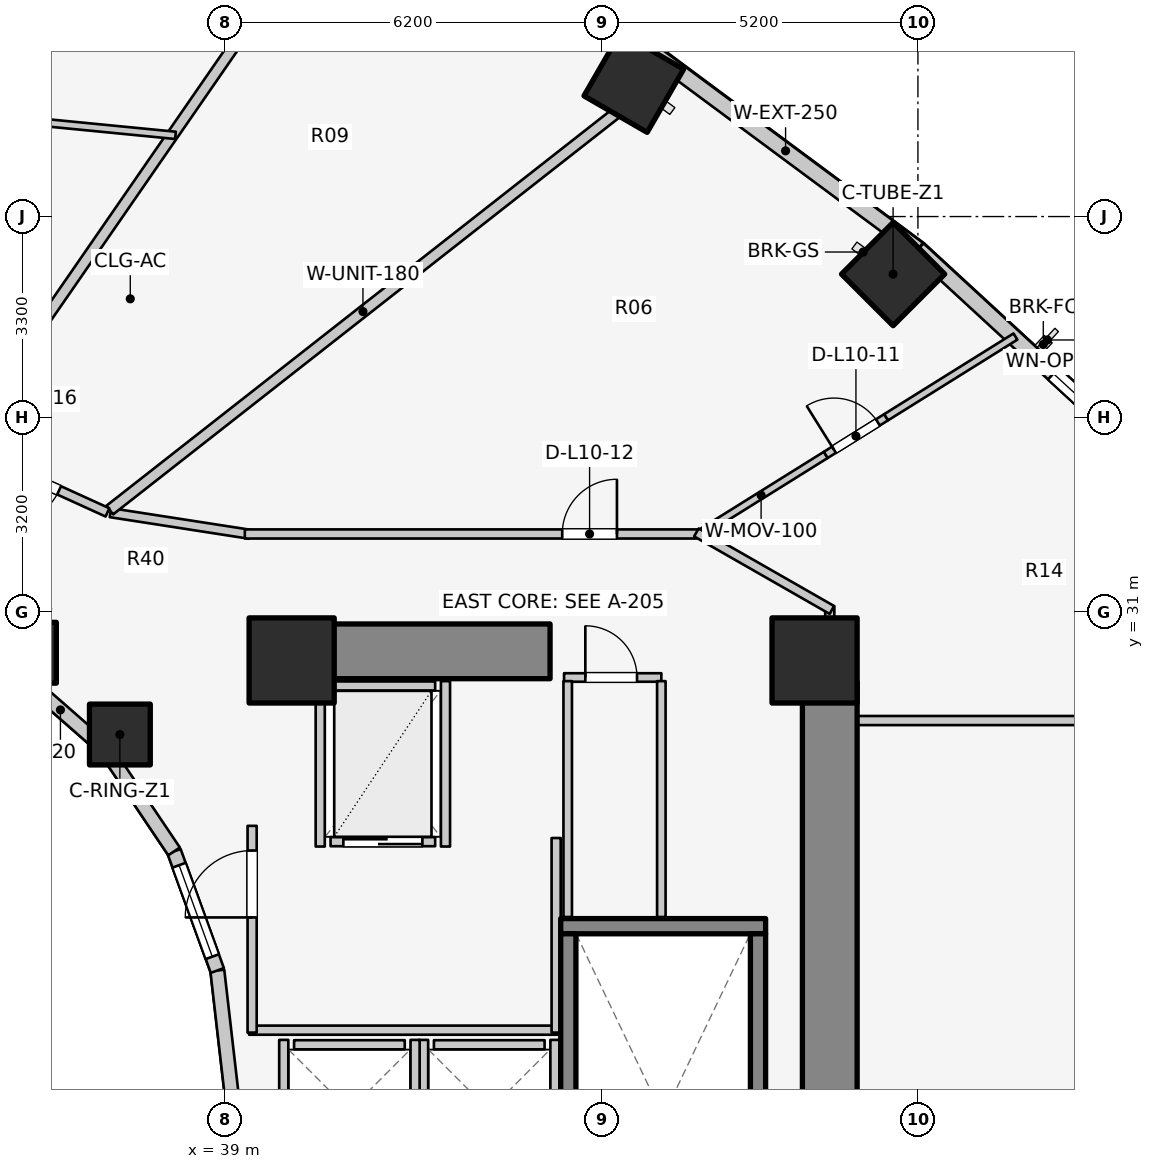
"""IFC4 building model, lengths in metres.
Left out: names, types, materials, properties, quantities, classifications, styles, units other than length and angle.
Written with IfcOpenShell. Run it as: python <this file> out.ifc"""

import sys

from ifc_helpers import new_model, si_unit, direction, frame, frame_2d, origin, origin_2d, place, context, subcontext, project, spatial, rectangle, extrude, element, fill, save


model = new_model("IFC4")
c1 = context("Model", 3, precision=1e-05, world=origin(), true_north=direction((0.0, 1.0)))
c2 = subcontext(c1, "Body", "Model", "MODEL_VIEW")
j1 = project(units=[si_unit("LENGTHUNIT", "METRE"), si_unit("PLANEANGLEUNIT", "RADIAN")], contexts=[c1])
p1 = place(None, origin())
s1 = spatial("IfcSite", under=j1, at=p1, CompositionType="ELEMENT")
p2 = place(p1, origin())
s2 = spatial("IfcBuilding", under=s1, at=p2, CompositionType="ELEMENT")
p3 = place(p2, frame((0.0, 0.0, 36.9)))
s3 = spatial("IfcBuildingStorey", under=s2, at=p3, CompositionType="ELEMENT", Elevation=36.9)
p4 = place(p3, frame((48.95, 17.05, 0.0), z_axis=(0.0, 0.0, 1.0), x_axis=(0.0, 1.0, 0.0)))
e1 = element("IfcWall", 1, at=p4, inside=s3, PredefinedType="SHEAR", context=c2, shape_type="SweptSolid", body=[
    extrude(rectangle(XDim=12.8, YDim=0.9, at=frame_2d((6.4, 0.0))), origin(), (0.0, 0.0, 1.0), 3.1),
])
p5 = place(p3, frame((39.85, 30.35, 0.0), z_axis=(0.0, 0.0, 1.0), x_axis=(1.0, 0.0, 0.0)))
e2 = element("IfcWall", 2, at=p5, inside=s3, PredefinedType="SHEAR", context=c2, shape_type="SweptSolid", body=[
    extrude(rectangle(XDim=4.5, YDim=0.9, at=frame_2d((2.25, 0.0))), origin(), (0.0, 0.0, 1.0), 3.1),
])
p6 = place(p3, frame((44.525, 25.83, 0.0), z_axis=(0.0, 0.0, 1.0), x_axis=(1.0, 0.0, 0.0)))
e3 = element("IfcWall", 3, at=p6, inside=s3, PredefinedType="SOLIDWALL", context=c2, shape_type="SweptSolid", body=[
    extrude(rectangle(XDim=3.37, YDim=0.25, at=frame_2d((1.685, 0.0))), origin(), (0.0, 0.0, 1.0), 3.1),
])
for number, where, z_axis, x_axis in (
    (4, (44.65, 17.895, 0.0), (0.0, 0.0, 1.0), (0.0, 1.0, 0.0)),
    (5, (47.77, 17.895, 0.0), (0.0, 0.0, 1.0), (0.0, 1.0, 0.0)),
):
    element("IfcWall", number, at=place(p3, frame(where, z_axis=z_axis, x_axis=x_axis)), inside=s3, PredefinedType="SOLIDWALL", context=c2, shape_type="SweptSolid", body=[
        extrude(rectangle(XDim=7.81, YDim=0.25, at=frame_2d((3.905, 0.0))), origin(), (0.0, 0.0, 1.0), 3.1),
    ])
for number, where, z_axis, x_axis in (
    (6, (48.7, 30.2, 0.0), (0.0, 0.0, 1.0), (1.0, 0.0, 0.0)),
    (7, (40.1, 30.2, 0.0), (0.0, 0.0, 1.0), (1.0, 0.0, 0.0)),
):
    element("IfcColumn", number, at=place(p3, frame(where, z_axis=z_axis, x_axis=x_axis)), inside=s3, PredefinedType="COLUMN", context=c2, shape_type="SweptSolid", body=[
        extrude(rectangle(XDim=1.4, YDim=1.4, at=origin_2d()), origin(), (0.0, 0.0, 1.0), 3.1),
    ])
p7 = place(p3, frame((37.275, 28.982, 0.0), z_axis=(0.0, 0.0, 1.0), x_axis=(1.0, 0.0, 0.0)))
e8 = element("IfcColumn", 8, at=p7, inside=s3, PredefinedType="COLUMN", context=c2, shape_type="SweptSolid", body=[
    extrude(rectangle(XDim=1.0, YDim=1.0, at=origin_2d()), origin(), (0.0, 0.0, 1.0), 3.1),
])
p8 = place(p3, frame((49.992, 36.554, 0.0), z_axis=(0.0, 0.0, 1.0), x_axis=(0.707106781187, 0.707106781187, 0.0)))
e9 = element("IfcColumn", 9, at=p8, inside=s3, PredefinedType="COLUMN", context=c2, shape_type="SweptSolid", body=[
    extrude(rectangle(XDim=1.2, YDim=1.2, at=origin_2d()), origin(), (0.0, 0.0, 1.0), 3.1),
])
p9 = place(p3, frame((35.73, 30.327, 0.0), z_axis=(0.0, 0.0, 1.0), x_axis=(1.0, 0.0, 0.0)))
e10 = element("IfcColumn", 10, at=p9, inside=s3, PredefinedType="COLUMN", context=c2, shape_type="SweptSolid", body=[
    extrude(rectangle(XDim=1.0, YDim=1.0, at=origin_2d()), origin(), (0.0, 0.0, 1.0), 3.1),
])
p10 = place(p3, frame((45.727, 39.704, 0.0), z_axis=(0.0, 0.0, 1.0), x_axis=(0.5, 0.866025403784, 0.0)))
e11 = element("IfcColumn", 11, at=p10, inside=s3, PredefinedType="COLUMN", context=c2, shape_type="SweptSolid", body=[
    extrude(rectangle(XDim=1.2, YDim=1.2, at=origin_2d()), origin(), (0.0, 0.0, 1.0), 3.1),
])
p11 = place(p3, frame((39.12, 23.0, 0.0), z_axis=(0.0, 0.0, 1.0), x_axis=(-0.114711713601, 0.993398823617, 0.0)))
e12 = element("IfcWall", 12, at=p11, inside=s3, PredefinedType="STANDARD", context=c2, shape_type="SweptSolid", body=[
    extrude(rectangle(XDim=2.115, YDim=0.23, at=frame_2d((1.058, 0.0))), origin(), (0.0, 0.0, 1.0), 2.84),
])
p12 = place(p3, frame((38.877, 25.102, 0.0), z_axis=(0.0, 0.0, 1.0), x_axis=(-0.341423187295, 0.93990968033, 0.0)))
e13 = element("IfcWall", 13, at=p12, inside=s3, PredefinedType="STANDARD", context=c2, shape_type="SweptSolid", body=[
    extrude(rectangle(XDim=2.084, YDim=0.23, at=frame_2d((1.042, 0.0))), origin(), (0.0, 0.0, 1.0), 2.84),
])
p13 = place(p12, frame((0.242, 0.0, 0.85)))
e14 = element("IfcOpeningElement", 14, at=p13, cuts=e13, PredefinedType="OPENING", context=c2, shape_type="SweptSolid", body=[
    extrude(rectangle(XDim=1.6, YDim=1.65, at=frame_2d((0.8, 0.825))), frame((0.0, 0.125, 0.0), z_axis=(0.0, -1.0, 0.0), x_axis=(1.0, 0.0, 0.0)), (0.0, 0.0, 1.0), 0.25),
])
p14 = place(p3, frame((38.166, 27.06, 0.0), z_axis=(0.0, 0.0, 1.0), x_axis=(-0.558197800898, 0.829707909492, 0.0)))
e15 = element("IfcWall", 15, at=p14, inside=s3, PredefinedType="STANDARD", context=c2, shape_type="SweptSolid", body=[
    extrude(rectangle(XDim=2.027, YDim=0.23, at=frame_2d((1.013, 0.0))), origin(), (0.0, 0.0, 1.0), 2.16),
])
p15 = place(p3, frame((37.035, 28.742, 0.0), z_axis=(0.0, 0.0, 1.0), x_axis=(-0.752576694707, 0.658504607869, 0.0)))
e16 = element("IfcWall", 16, at=p15, inside=s3, PredefinedType="STANDARD", context=c2, shape_type="SweptSolid", body=[
    extrude(rectangle(XDim=1.959, YDim=0.23, at=frame_2d((0.98, 0.0))), origin(), (0.0, 0.0, 1.0), 2.16),
])
p16 = place(p3, frame((54.194, 33.476, 0.0), z_axis=(0.0, 0.0, 1.0), x_axis=(-0.735655109293, 0.67735630223, 0.0)))
e17 = element("IfcWall", 17, at=p16, inside=s3, PredefinedType="STANDARD", context=c2, shape_type="SweptSolid", body=[
    extrude(rectangle(XDim=5.151, YDim=0.26, at=frame_2d((2.575, 0.0))), origin(), (0.0, 0.0, 1.0), 2.85),
])
p17 = place(p16, frame((0.929, 0.0, 0.75)))
e18 = element("IfcOpeningElement", 18, at=p17, cuts=e17, PredefinedType="OPENING", context=c2, shape_type="SweptSolid", body=[
    extrude(rectangle(XDim=1.2, YDim=1.5, at=frame_2d((0.6, 0.75))), frame((0.0, 0.14, 0.0), z_axis=(0.0, -1.0, 0.0), x_axis=(1.0, 0.0, 0.0)), (0.0, 0.0, 1.0), 0.28),
])
p18 = place(p3, frame((50.405, 36.965, 0.0), z_axis=(0.0, 0.0, 1.0), x_axis=(-0.803477531792, 0.595335078679, 0.0)))
e19 = element("IfcWall", 19, at=p18, inside=s3, PredefinedType="STANDARD", context=c2, shape_type="SweptSolid", body=[
    extrude(rectangle(XDim=5.43, YDim=0.26, at=frame_2d((2.715, 0.0))), origin(), (0.0, 0.0, 1.0), 2.85),
])
p19 = place(p3, frame((46.042, 40.197, 0.0), z_axis=(0.0, 0.0, 1.0), x_axis=(-0.919612132394, 0.39282760335, 0.0)))
e20 = element("IfcWall", 20, at=p19, inside=s3, PredefinedType="STANDARD", context=c2, shape_type="SweptSolid", body=[
    extrude(rectangle(XDim=6.209, YDim=0.26, at=frame_2d((3.105, 0.0))), origin(), (0.0, 0.0, 1.0), 2.85),
])
p20 = place(p19, frame((2.355, 0.0, 0.75)))
e21 = element("IfcOpeningElement", 21, at=p20, cuts=e20, PredefinedType="OPENING", context=c2, shape_type="SweptSolid", body=[
    extrude(rectangle(XDim=1.5, YDim=1.6, at=frame_2d((0.75, 0.8))), frame((0.0, 0.14, 0.0), z_axis=(0.0, -1.0, 0.0), x_axis=(1.0, 0.0, 0.0)), (0.0, 0.0, 1.0), 0.28),
])
p21 = place(p3, frame((42.44, 23.88, 0.0), z_axis=(0.0, 0.0, 1.0), x_axis=(1.0, 0.0, 0.0)))
e22 = element("IfcWall", 22, at=p21, inside=s3, PredefinedType="SOLIDWALL", context=c2, shape_type="SweptSolid", body=[
    extrude(rectangle(XDim=1.82, YDim=0.15, at=frame_2d((0.91, 0.0))), origin(), (0.0, 0.0, 1.0), 2.855),
])
for number, where, z_axis, x_axis in (
    (23, (42.27, 21.64, 0.0), (0.0, 0.0, 1.0), (0.0, 1.0, 0.0)),
    (24, (44.43, 21.64, 0.0), (0.0, 0.0, 1.0), (0.0, 1.0, 0.0)),
):
    element("IfcWall", number, at=place(p3, frame(where, z_axis=z_axis, x_axis=x_axis)), inside=s3, PredefinedType="SOLIDWALL", context=c2, shape_type="SweptSolid", body=[
        extrude(rectangle(XDim=2.32, YDim=0.15, at=frame_2d((1.16, 0.0))), origin(), (0.0, 0.0, 1.0), 2.855),
    ])
p22 = place(p3, frame((40.14, 23.88, 0.0), z_axis=(0.0, 0.0, 1.0), x_axis=(1.0, 0.0, 0.0)))
e25 = element("IfcWall", 25, at=p22, inside=s3, PredefinedType="SOLIDWALL", context=c2, shape_type="SweptSolid", body=[
    extrude(rectangle(XDim=1.82, YDim=0.15, at=frame_2d((0.91, 0.0))), origin(), (0.0, 0.0, 1.0), 2.12),
])
p23 = place(p3, frame((39.97, 21.64, 0.0), z_axis=(0.0, 0.0, 1.0), x_axis=(0.0, 1.0, 0.0)))
e26 = element("IfcWall", 26, at=p23, inside=s3, PredefinedType="SOLIDWALL", context=c2, shape_type="SweptSolid", body=[
    extrude(rectangle(XDim=2.32, YDim=0.15, at=frame_2d((1.16, 0.0))), origin(), (0.0, 0.0, 1.0), 2.12),
])
p24 = place(p3, frame((42.13, 21.64, 0.0), z_axis=(0.0, 0.0, 1.0), x_axis=(0.0, 1.0, 0.0)))
e27 = element("IfcWall", 27, at=p24, inside=s3, PredefinedType="SOLIDWALL", context=c2, shape_type="SweptSolid", body=[
    extrude(rectangle(XDim=2.32, YDim=0.15, at=frame_2d((1.16, 0.0))), origin(), (0.0, 0.0, 1.0), 2.855),
])
p25 = place(p3, frame((40.74, 27.22, 0.0), z_axis=(0.0, 0.0, 1.0), x_axis=(1.0, 0.0, 0.0)))
e28 = element("IfcWall", 28, at=p25, inside=s3, PredefinedType="SOLIDWALL", context=c2, shape_type="SweptSolid", body=[
    extrude(rectangle(XDim=1.72, YDim=0.15, at=frame_2d((0.86, 0.0))), origin(), (0.0, 0.0, 1.0), 2.855),
])
p26 = place(p25, frame((0.21, 0.0, 0.0)))
e29 = element("IfcOpeningElement", 29, at=p26, cuts=e28, PredefinedType="OPENING", context=c2, shape_type="SweptSolid", body=[
    extrude(rectangle(XDim=1.3, YDim=2.1, at=frame_2d((0.65, 1.05))), frame((0.0, 0.085, 0.0), z_axis=(0.0, -1.0, 0.0), x_axis=(1.0, 0.0, 0.0)), (0.0, 0.0, 1.0), 0.17),
])
p27 = place(p3, frame((40.74, 29.78, 0.0), z_axis=(0.0, 0.0, 1.0), x_axis=(1.0, 0.0, 0.0)))
e30 = element("IfcWall", 30, at=p27, inside=s3, PredefinedType="SOLIDWALL", context=c2, shape_type="SweptSolid", body=[
    extrude(rectangle(XDim=1.72, YDim=0.15, at=frame_2d((0.86, 0.0))), origin(), (0.0, 0.0, 1.0), 2.855),
])
for number, where, z_axis, x_axis in (
    (31, (40.57, 27.14, 0.0), (0.0, 0.0, 1.0), (0.0, 1.0, 0.0)),
    (32, (42.63, 27.14, 0.0), (0.0, 0.0, 1.0), (0.0, 1.0, 0.0)),
):
    element("IfcWall", number, at=place(p3, frame(where, z_axis=z_axis, x_axis=x_axis)), inside=s3, PredefinedType="SOLIDWALL", context=c2, shape_type="SweptSolid", body=[
        extrude(rectangle(XDim=2.72, YDim=0.15, at=frame_2d((1.36, 0.0))), origin(), (0.0, 0.0, 1.0), 2.855),
    ])
p28 = place(p3, frame((39.4, 24.12, 0.0), z_axis=(0.0, 0.0, 1.0), x_axis=(1.0, 0.0, 0.0)))
e33 = element("IfcWall", 33, at=p28, inside=s3, PredefinedType="PARTITIONING", context=c2, shape_type="SweptSolid", body=[
    extrude(rectangle(XDim=5.08, YDim=0.15, at=frame_2d((2.54, 0.0))), origin(), (0.0, 0.0, 1.0), 2.12),
])
p29 = place(p3, frame((44.45, 24.08, 0.0), z_axis=(0.0, 0.0, 1.0), x_axis=(0.0, 1.0, 0.0)))
e34 = element("IfcWall", 34, at=p29, inside=s3, PredefinedType="PARTITIONING", context=c2, shape_type="SweptSolid", body=[
    extrude(rectangle(XDim=3.2, YDim=0.15, at=frame_2d((1.6, 0.0))), origin(), (0.0, 0.0, 1.0), 2.855),
])
p30 = place(p3, frame((39.45, 24.08, 0.0), z_axis=(0.0, 0.0, 1.0), x_axis=(0.0, 1.0, 0.0)))
e35 = element("IfcWall", 35, at=p30, inside=s3, PredefinedType="PARTITIONING", context=c2, shape_type="SweptSolid", body=[
    extrude(rectangle(XDim=3.4, YDim=0.15, at=frame_2d((1.7, 0.0))), origin(), (0.0, 0.0, 1.0), 2.855),
])
p31 = place(p30, frame((1.894, 0.0, 0.0)))
e36 = element("IfcOpeningElement", 36, at=p31, cuts=e35, PredefinedType="OPENING", context=c2, shape_type="SweptSolid", body=[
    extrude(rectangle(XDim=1.1, YDim=2.1, at=frame_2d((0.55, 1.05))), frame((0.0, 0.085, 0.0), z_axis=(0.0, -1.0, 0.0), x_axis=(1.0, 0.0, 0.0)), (0.0, 0.0, 1.0), 0.17),
])
p32 = place(p3, frame((44.58, 29.92, 0.0), z_axis=(0.0, 0.0, 1.0), x_axis=(1.0, 0.0, 0.0)))
e37 = element("IfcWall", 37, at=p32, inside=s3, PredefinedType="PLUMBINGWALL", context=c2, shape_type="SweptSolid", body=[
    extrude(rectangle(XDim=1.6, YDim=0.14, at=frame_2d((0.8, 0.0))), origin(), (0.0, 0.0, 1.0), 2.855),
])
p33 = place(p32, frame((0.35, 0.0, 0.0)))
e38 = element("IfcOpeningElement", 38, at=p33, cuts=e37, PredefinedType="OPENING", context=c2, shape_type="SweptSolid", body=[
    extrude(rectangle(XDim=0.85, YDim=2.05, at=frame_2d((0.425, 1.025))), frame((0.0, 0.08, 0.0), z_axis=(0.0, -1.0, 0.0), x_axis=(1.0, 0.0, 0.0)), (0.0, 0.0, 1.0), 0.16),
])
for number, where, z_axis, x_axis in (
    (39, (44.64, 25.98, 0.0), (0.0, 0.0, 1.0), (0.0, 1.0, 0.0)),
    (40, (46.18, 25.98, 0.0), (0.0, 0.0, 1.0), (0.0, 1.0, 0.0)),
):
    element("IfcWall", number, at=place(p3, frame(where, z_axis=z_axis, x_axis=x_axis)), inside=s3, PredefinedType="PLUMBINGWALL", context=c2, shape_type="SweptSolid", body=[
        extrude(rectangle(XDim=3.88, YDim=0.14, at=frame_2d((1.94, 0.0))), origin(), (0.0, 0.0, 1.0), 2.855),
    ])
p34 = place(p3, frame((48.95, 29.212, 0.0), z_axis=(0.0, 0.0, 1.0), x_axis=(1.0, 0.0, 0.0)))
e41 = element("IfcWall", 41, at=p34, inside=s3, PredefinedType="PARTITIONING", context=c2, shape_type="SweptSolid", body=[
    extrude(rectangle(XDim=8.036, YDim=0.15, at=frame_2d((4.018, 0.0))), origin(), (0.0, 0.0, 1.0), 2.855),
])
p35 = place(p3, frame((48.95, 29.8, 0.0), z_axis=(0.0, 0.0, 1.0), x_axis=(0.0, 1.0, 0.0)))
e42 = element("IfcWall", 42, at=p35, inside=s3, PredefinedType="PARTITIONING", context=c2, shape_type="SweptSolid", body=[
    extrude(rectangle(XDim=1.29, YDim=0.15, at=frame_2d((0.645, 0.0))), origin(), (0.0, 0.0, 1.0), 2.069),
])
p36 = place(p3, frame((46.758, 32.253, 0.0), z_axis=(0.0, 0.0, 1.0), x_axis=(0.848408422278, 0.529342185177, 0.0)))
e43 = element("IfcWall", 43, at=p36, inside=s3, PredefinedType="MOVABLE", context=c2, shape_type="SweptSolid", body=[
    extrude(rectangle(XDim=2.507, YDim=0.12, at=frame_2d((1.253, 0.0))), origin(), (0.0, 0.0, 1.0), 2.855),
])
p37 = place(p3, frame((48.884, 33.58, 0.0), z_axis=(0.0, 0.0, 1.0), x_axis=(0.848396621262, 0.529361098903, 0.0)))
e44 = element("IfcWall", 44, at=p37, inside=s3, PredefinedType="MOVABLE", context=c2, shape_type="SweptSolid", body=[
    extrude(rectangle(XDim=1.17, YDim=0.12, at=frame_2d((0.585, 0.0))), origin(), (0.0, 0.0, 1.0), 2.11),
])
p38 = place(p37, frame((0.16, 0.0, 0.0)))
e45 = element("IfcOpeningElement", 45, at=p38, cuts=e44, PredefinedType="OPENING", context=c2, shape_type="SweptSolid", body=[
    extrude(rectangle(XDim=0.85, YDim=2.05, at=frame_2d((0.425, 1.025))), frame((0.0, 0.07, 0.0), z_axis=(0.0, -1.0, 0.0), x_axis=(1.0, 0.0, 0.0)), (0.0, 0.0, 1.0), 0.14),
])
p39 = place(p3, frame((49.877, 34.2, 0.0), z_axis=(0.0, 0.0, 1.0), x_axis=(0.848424873637, 0.529315816687, 0.0)))
e46 = element("IfcWall", 46, at=p39, inside=s3, PredefinedType="MOVABLE", context=c2, shape_type="SweptSolid", body=[
    extrude(rectangle(XDim=2.506, YDim=0.12, at=frame_2d((1.253, 0.0))), origin(), (0.0, 0.0, 1.0), 2.855),
])
p40 = place(p3, frame((37.119, 32.631, 0.0), z_axis=(0.0, 0.0, 1.0), x_axis=(0.988184633586, -0.153268163508, 0.0)))
e47 = element("IfcWall", 47, at=p40, inside=s3, PredefinedType="PARTITIONING", context=c2, shape_type="SweptSolid", body=[
    extrude(rectangle(XDim=2.318, YDim=0.15, at=frame_2d((1.159, 0.0))), origin(), (0.0, 0.0, 1.0), 2.237),
])
p41 = place(p3, frame((39.33, 32.28, 0.0), z_axis=(0.0, 0.0, 1.0), x_axis=(1.0, 0.0, 0.0)))
e48 = element("IfcWall", 48, at=p41, inside=s3, PredefinedType="PARTITIONING", context=c2, shape_type="SweptSolid", body=[
    extrude(rectangle(XDim=7.52, YDim=0.15, at=frame_2d((3.76, 0.0))), origin(), (0.0, 0.0, 1.0), 2.237),
])
p42 = place(p41, frame((5.22, 0.0, 0.0)))
e49 = element("IfcOpeningElement", 49, at=p42, cuts=e48, PredefinedType="OPENING", context=c2, shape_type="SweptSolid", body=[
    extrude(rectangle(XDim=0.9, YDim=2.1, at=frame_2d((0.45, 1.05))), frame((0.0, 0.085, 0.0), z_axis=(0.0, -1.0, 0.0), x_axis=(1.0, 0.0, 0.0)), (0.0, 0.0, 1.0), 0.17),
])
p43 = place(p3, frame((46.757, 32.305, 0.0), z_axis=(0.0, 0.0, 1.0), x_axis=(0.867991349648, -0.496579315857, 0.0)))
e50 = element("IfcWall", 50, at=p43, inside=s3, PredefinedType="PARTITIONING", context=c2, shape_type="SweptSolid", body=[
    extrude(rectangle(XDim=2.567, YDim=0.15, at=frame_2d((1.283, 0.0))), origin(), (0.0, 0.0, 1.0), 2.069),
])
p44 = place(p3, frame((37.108, 32.673, 0.0), z_axis=(0.0, 0.0, 1.0), x_axis=(0.78700868866, 0.616941912966, 0.0)))
e51 = element("IfcWall", 51, at=p44, inside=s3, PredefinedType="PARTITIONING", context=c2, shape_type="SweptSolid", body=[
    extrude(rectangle(XDim=10.583, YDim=0.18, at=frame_2d((5.292, 0.0))), origin(), (0.0, 0.0, 1.0), 2.237),
])
p45 = place(p3, frame((34.653, 33.796, 0.0), z_axis=(0.0, 0.0, 1.0), x_axis=(0.568631434817, 0.822592421153, 0.0)))
e52 = element("IfcWall", 52, at=p45, inside=s3, PredefinedType="PARTITIONING", context=c2, shape_type="SweptSolid", body=[
    extrude(rectangle(XDim=9.394, YDim=0.18, at=frame_2d((4.697, 0.0))), origin(), (0.0, 0.0, 1.0), 2.237),
])
p46 = place(p3, frame((37.071, 32.635, 0.0), z_axis=(0.0, 0.0, 1.0), x_axis=(-0.910186679378, 0.414198272186, 0.0)))
e53 = element("IfcWall", 53, at=p46, inside=s3, PredefinedType="PARTITIONING", context=c2, shape_type="SweptSolid", body=[
    extrude(rectangle(XDim=2.698, YDim=0.15, at=frame_2d((1.349, 0.0))), origin(), (0.0, 0.0, 1.0), 2.237),
])
p47 = place(p46, frame((0.874, 0.0, 0.0)))
e54 = element("IfcOpeningElement", 54, at=p47, cuts=e53, PredefinedType="OPENING", context=c2, shape_type="SweptSolid", body=[
    extrude(rectangle(XDim=0.95, YDim=2.1, at=frame_2d((0.475, 1.05))), frame((0.0, 0.085, 0.0), z_axis=(0.0, -1.0, 0.0), x_axis=(1.0, 0.0, 0.0)), (0.0, 0.0, 1.0), 0.17),
])
p48 = place(p3, frame((38.19, 38.835, 0.0), z_axis=(0.0, 0.0, 1.0), x_axis=(-0.995257435484, 0.097276087063, 0.0)))
e55 = element("IfcWall", 55, at=p48, inside=s3, PredefinedType="MOVABLE", context=c2, shape_type="SweptSolid", body=[
    extrude(rectangle(XDim=6.229, YDim=0.12, at=frame_2d((3.115, 0.0))), origin(), (0.0, 0.0, 1.0), 2.237),
])
p49 = place(p13, origin())
e56 = element("IfcWindow", 56, at=p49, inside=s3, PartitioningType="SINGLE_PANEL", PredefinedType="WINDOW", context=c2, shape_type="SweptSolid", body=[
    extrude(rectangle(XDim=1.6, YDim=1.65, at=frame_2d((0.8, 0.825))), frame((0.0, 0.03, 0.0), z_axis=(0.0, -1.0, 0.0), x_axis=(1.0, 0.0, 0.0)), (0.0, 0.0, 1.0), 0.06),
])
fill(e14, e56)
p50 = place(p17, origin())
e57 = element("IfcWindow", 57, at=p50, inside=s3, PartitioningType="SINGLE_PANEL", PredefinedType="WINDOW", context=c2, shape_type="SweptSolid", body=[
    extrude(rectangle(XDim=1.2, YDim=1.5, at=frame_2d((0.6, 0.75))), frame((0.0, 0.03, 0.0), z_axis=(0.0, -1.0, 0.0), x_axis=(1.0, 0.0, 0.0)), (0.0, 0.0, 1.0), 0.06),
])
fill(e18, e57)
p51 = place(p26, origin())
e58 = element("IfcDoor", 58, at=p51, inside=s3, OperationType="DOUBLE_DOOR_SLIDING", PredefinedType="DOOR", context=c2, shape_type="SweptSolid", body=[
    extrude(rectangle(XDim=1.3, YDim=2.1, at=frame_2d((0.65, 1.05))), frame((0.0, 0.025, 0.0), z_axis=(0.0, -1.0, 0.0), x_axis=(1.0, 0.0, 0.0)), (0.0, 0.0, 1.0), 0.05),
])
fill(e29, e58)
p52 = place(p31, origin())
e59 = element("IfcDoor", 59, at=p52, inside=s3, OperationType="SINGLE_SWING_LEFT", PredefinedType="DOOR", context=c2, shape_type="SweptSolid", body=[
    extrude(rectangle(XDim=1.1, YDim=2.1, at=frame_2d((0.55, 1.05))), frame((0.0, 0.025, 0.0), z_axis=(0.0, -1.0, 0.0), x_axis=(1.0, 0.0, 0.0)), (0.0, 0.0, 1.0), 0.05),
])
fill(e36, e59)
p53 = place(p33, origin())
e60 = element("IfcDoor", 60, at=p53, inside=s3, OperationType="SINGLE_SWING_LEFT", PredefinedType="DOOR", context=c2, shape_type="SweptSolid", body=[
    extrude(rectangle(XDim=0.85, YDim=2.05, at=frame_2d((0.425, 1.025))), frame((0.0, 0.025, 0.0), z_axis=(0.0, -1.0, 0.0), x_axis=(1.0, 0.0, 0.0)), (0.0, 0.0, 1.0), 0.05),
])
fill(e38, e60)
p54 = place(p38, origin())
e61 = element("IfcDoor", 61, at=p54, inside=s3, OperationType="SINGLE_SWING_LEFT", PredefinedType="DOOR", context=c2, shape_type="SweptSolid", body=[
    extrude(rectangle(XDim=0.85, YDim=2.05, at=frame_2d((0.425, 1.025))), frame((0.0, 0.025, 0.0), z_axis=(0.0, -1.0, 0.0), x_axis=(1.0, 0.0, 0.0)), (0.0, 0.0, 1.0), 0.05),
])
fill(e45, e61)
p55 = place(p42, origin())
e62 = element("IfcDoor", 62, at=p55, inside=s3, OperationType="SINGLE_SWING_RIGHT", PredefinedType="DOOR", context=c2, shape_type="SweptSolid", body=[
    extrude(rectangle(XDim=0.9, YDim=2.1, at=frame_2d((0.45, 1.05))), frame((0.0, 0.025, 0.0), z_axis=(0.0, -1.0, 0.0), x_axis=(1.0, 0.0, 0.0)), (0.0, 0.0, 1.0), 0.05),
])
fill(e49, e62)
p56 = place(p47, origin())
e63 = element("IfcDoor", 63, at=p56, inside=s3, OperationType="SINGLE_SWING_RIGHT", PredefinedType="DOOR", context=c2, shape_type="SweptSolid", body=[
    extrude(rectangle(XDim=0.95, YDim=2.1, at=frame_2d((0.475, 1.05))), frame((0.0, 0.025, 0.0), z_axis=(0.0, -1.0, 0.0), x_axis=(1.0, 0.0, 0.0)), (0.0, 0.0, 1.0), 0.05),
])
fill(e54, e63)
save(model, sys.argv[1])
